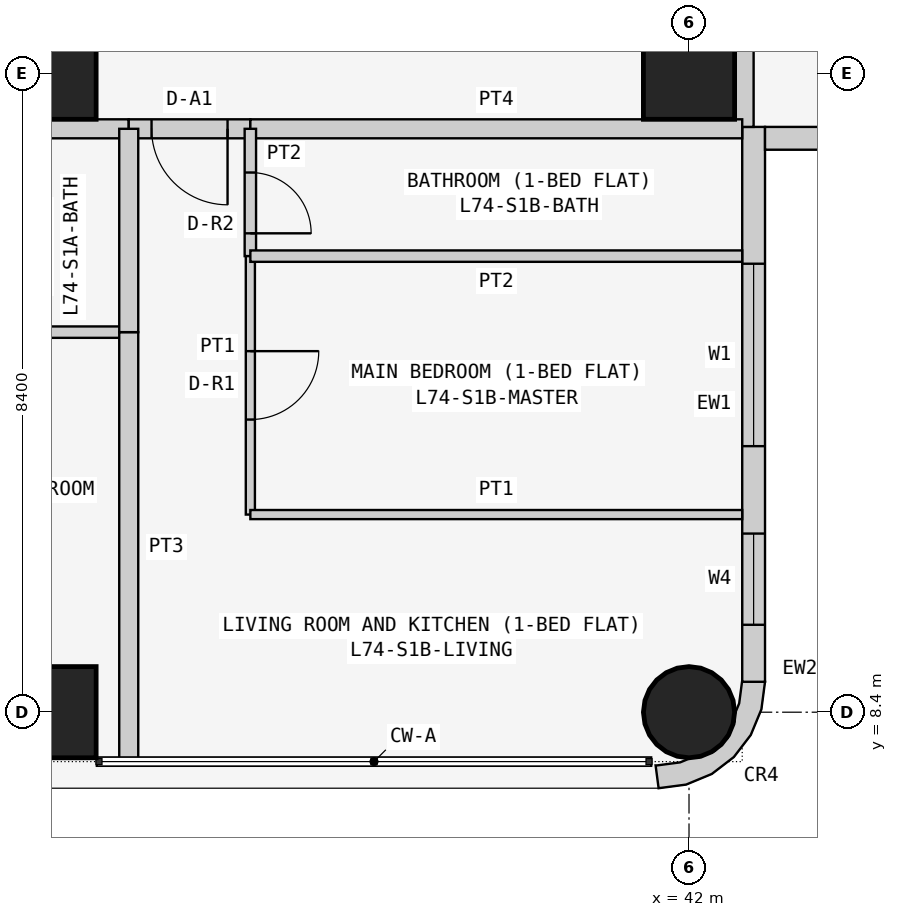
"""IFC4 building model, lengths in metres.
Left out: names, types, materials, properties, quantities, classifications, styles, units other than length and angle.
Written with IfcOpenShell. Run it as: python <this file> out.ifc"""

import sys

from ifc_helpers import new_model, si_unit, direction, frame, frame_2d, origin, origin_2d, place, context, subcontext, project, spatial, polyline, rectangle, circle, outline, extrude, element, fill, save


model = new_model("IFC4")
c1 = context("Model", 3, precision=1e-05, world=origin(), true_north=direction((0.0, 1.0)))
c2 = subcontext(c1, "Body", "Model", "MODEL_VIEW")
j1 = project(units=[si_unit("LENGTHUNIT", "METRE"), si_unit("PLANEANGLEUNIT", "RADIAN")], contexts=[c1])
p1 = place(None, origin())
s1 = spatial("IfcSite", under=j1, at=p1, CompositionType="ELEMENT")
p2 = place(p1, origin())
s2 = spatial("IfcBuilding", under=s1, at=p2, CompositionType="ELEMENT")
p3 = place(p2, frame((0.0, 0.0, 282.9)))
s3 = spatial("IfcBuildingStorey", under=s2, at=p3, CompositionType="ELEMENT", Elevation=282.9)
for number, where, z_axis, x_axis in (
    (1, (33.6, 8.4, 0.0), (0.0, 0.0, 1.0), (1.0, 0.0, 0.0)),
    (2, (33.6, 16.8, 0.0), (0.0, 0.0, 1.0), (1.0, 0.0, 0.0)),
):
    element("IfcColumn", number, at=place(p3, frame(where, z_axis=z_axis, x_axis=x_axis)), inside=s3, PredefinedType="COLUMN", context=c2, shape_type="SweptSolid", body=[
        extrude(rectangle(XDim=1.2, YDim=1.2, at=origin_2d()), origin(), (0.0, 0.0, 1.0), 3.6),
    ])
p4 = place(p3, frame((42.0, 8.4, 0.0), z_axis=(0.0, 0.0, 1.0), x_axis=(1.0, 0.0, 0.0)))
e3 = element("IfcColumn", 3, at=p4, inside=s3, PredefinedType="COLUMN", context=c2, shape_type="SweptSolid", body=[
    extrude(circle(Radius=0.6, at=origin_2d()), origin(), (0.0, 0.0, 1.0), 3.6),
])
p5 = place(p3, frame((42.0, 16.8, 0.0), z_axis=(0.0, 0.0, 1.0), x_axis=(1.0, 0.0, 0.0)))
e4 = element("IfcColumn", 4, at=p5, inside=s3, PredefinedType="COLUMN", context=c2, shape_type="SweptSolid", body=[
    extrude(rectangle(XDim=1.2, YDim=1.2, at=origin_2d()), origin(), (0.0, 0.0, 1.0), 3.6),
])
p6 = place(p3, frame((42.85, 8.8, 0.0), z_axis=(0.0, 0.0, 1.0), x_axis=(0.0, 1.0, 0.0)))
e5 = element("IfcWall", 5, at=p6, inside=s3, PredefinedType="SOLIDWALL", context=c2, shape_type="SweptSolid", body=[
    extrude(rectangle(XDim=7.3, YDim=0.3, at=frame_2d((3.65, 0.0))), origin(), (0.0, 0.0, 1.0), 3.45),
])
p7 = place(p6, frame((3.1, 0.0, 0.9)))
e6 = element("IfcOpeningElement", 6, at=p7, cuts=e5, PredefinedType="OPENING", context=c2, shape_type="SweptSolid", body=[
    extrude(rectangle(XDim=2.4, YDim=1.5, at=frame_2d((1.2, 0.75))), frame((0.0, 0.16, 0.0), z_axis=(0.0, -1.0, 0.0), x_axis=(1.0, 0.0, 0.0)), (0.0, 0.0, 1.0), 0.32),
])
p8 = place(p6, frame((0.75, 0.0, 0.9)))
e7 = element("IfcOpeningElement", 7, at=p8, cuts=e5, PredefinedType="OPENING", context=c2, shape_type="SweptSolid", body=[
    extrude(rectangle(XDim=1.2, YDim=1.5, at=frame_2d((0.6, 0.75))), frame((0.0, 0.16, 0.0), z_axis=(0.0, -1.0, 0.0), x_axis=(1.0, 0.0, 0.0)), (0.0, 0.0, 1.0), 0.32),
])
p9 = place(p3, frame((43.0, 15.95, 0.0), z_axis=(0.0, 0.0, 1.0), x_axis=(1.0, 0.0, 0.0)))
e8 = element("IfcWall", 8, at=p9, inside=s3, PredefinedType="SOLIDWALL", context=c2, shape_type="SweptSolid", body=[
    extrude(rectangle(XDim=7.0, YDim=0.3, at=frame_2d((3.5, 0.0))), origin(), (0.0, 0.0, 1.0), 3.45),
])
p10 = place(p9, frame((1.5, 0.0, 0.9)))
e9 = element("IfcOpeningElement", 9, at=p10, cuts=e8, PredefinedType="OPENING", context=c2, shape_type="SweptSolid", body=[
    extrude(rectangle(XDim=2.4, YDim=1.5, at=frame_2d((1.2, 0.75))), frame((0.0, 0.16, 0.0), z_axis=(0.0, -1.0, 0.0), x_axis=(1.0, 0.0, 0.0)), (0.0, 0.0, 1.0), 0.32),
])
p11 = place(p9, frame((5.05, 0.0, 0.9)))
e10 = element("IfcOpeningElement", 10, at=p11, cuts=e8, PredefinedType="OPENING", context=c2, shape_type="SweptSolid", body=[
    extrude(rectangle(XDim=1.2, YDim=1.5, at=frame_2d((0.6, 0.75))), frame((0.0, 0.16, 0.0), z_axis=(0.0, -1.0, 0.0), x_axis=(1.0, 0.0, 0.0)), (0.0, 0.0, 1.0), 0.32),
])
p12 = place(p3, frame((41.638, 7.824, 0.0), z_axis=(0.0, 0.0, 1.0), x_axis=(0.707106781187, -0.707106781187, 0.0)))
e11 = element("IfcWall", 11, at=p12, inside=s3, PredefinedType="SOLIDWALL", context=c2, shape_type="SweptSolid", body=[
    extrude(outline(polyline([(0.033, 1.469), (0.047, 1.455), (0.233, 1.212), (0.292, 1.069), (0.358, 1.003), (0.449, 0.782), (0.449, 0.543), (0.358, 0.322), (0.292, 0.257), (0.233, 0.114), (0.047, -0.129), (0.033, -0.143), (0.273, -0.327), (0.495, -0.037), (0.635, 0.301), (0.683, 0.663), (0.635, 1.025), (0.495, 1.363), (0.273, 1.653), (0.033, 1.469)])), origin(), (0.0, 0.0, 1.0), 3.45),
])
p13 = place(p3, frame((42.725, 22.971, 0.0), z_axis=(0.0, 0.0, 1.0), x_axis=(0.0, -1.0, 0.0)))
e12 = element("IfcWall", 12, at=p13, inside=s3, PredefinedType="PARTITIONING", context=c2, shape_type="SweptSolid", body=[
    extrude(rectangle(XDim=6.871, YDim=0.25, at=frame_2d((3.436, 0.0))), origin(), (0.0, 0.0, 1.0), 3.45),
])
p14 = place(p3, frame((34.629, 16.075, 0.0), z_axis=(0.0, 0.0, 1.0), x_axis=(-1.0, 0.0, 0.0)))
e13 = element("IfcWall", 13, at=p14, inside=s3, PredefinedType="PARTITIONING", context=c2, shape_type="SweptSolid", body=[
    extrude(rectangle(XDim=2.629, YDim=0.25, at=frame_2d((1.314, 0.0))), origin(), (0.0, 0.0, 1.0), 3.45),
])
p15 = place(p3, frame((36.229, 16.075, 0.0), z_axis=(0.0, 0.0, 1.0), x_axis=(-1.0, 0.0, 0.0)))
e14 = element("IfcWall", 14, at=p15, inside=s3, PredefinedType="PARTITIONING", context=c2, shape_type="SweptSolid", body=[
    extrude(rectangle(XDim=1.6, YDim=0.25, at=frame_2d((0.8, 0.0))), origin(), (0.0, 0.0, 1.0), 3.45),
])
p16 = place(p15, frame((0.3, 0.0, 0.0)))
e15 = element("IfcOpeningElement", 15, at=p16, cuts=e14, PredefinedType="OPENING", context=c2, shape_type="SweptSolid", body=[
    extrude(rectangle(XDim=1.0, YDim=2.1, at=frame_2d((0.5, 1.05))), frame((0.0, 0.135, 0.0), z_axis=(0.0, -1.0, 0.0), x_axis=(1.0, 0.0, 0.0)), (0.0, 0.0, 1.0), 0.27),
])
p17 = place(p3, frame((42.7, 16.075, 0.0), z_axis=(0.0, 0.0, 1.0), x_axis=(-1.0, 0.0, 0.0)))
e16 = element("IfcWall", 16, at=p17, inside=s3, PredefinedType="PARTITIONING", context=c2, shape_type="SweptSolid", body=[
    extrude(rectangle(XDim=6.471, YDim=0.25, at=frame_2d((3.235, 0.0))), origin(), (0.0, 0.0, 1.0), 3.45),
])
p18 = place(p3, frame((32.0, 13.4, 0.0), z_axis=(0.0, 0.0, 1.0), x_axis=(1.0, 0.0, 0.0)))
e17 = element("IfcWall", 17, at=p18, inside=s3, PredefinedType="PARTITIONING", context=c2, shape_type="SweptSolid", body=[
    extrude(rectangle(XDim=2.629, YDim=0.15, at=frame_2d((1.314, 0.0))), origin(), (0.0, 0.0, 1.0), 3.45),
])
p19 = place(p3, frame((34.629, 13.4, 0.0), z_axis=(0.0, 0.0, 1.0), x_axis=(0.0, -1.0, 0.0)))
e18 = element("IfcWall", 18, at=p19, inside=s3, PredefinedType="PARTITIONING", context=c2, shape_type="SweptSolid", body=[
    extrude(rectangle(XDim=5.65, YDim=0.25, at=frame_2d((2.825, 0.0))), origin(), (0.0, 0.0, 1.0), 3.45),
])
p20 = place(p3, frame((34.629, 13.4, 0.0), z_axis=(0.0, 0.0, 1.0), x_axis=(0.0, 1.0, 0.0)))
e19 = element("IfcWall", 19, at=p20, inside=s3, PredefinedType="PARTITIONING", context=c2, shape_type="SweptSolid", body=[
    extrude(rectangle(XDim=2.675, YDim=0.25, at=frame_2d((1.337, 0.0))), origin(), (0.0, 0.0, 1.0), 3.45),
])
p21 = place(p3, frame((36.229, 16.075, 0.0), z_axis=(0.0, 0.0, 1.0), x_axis=(0.0, -1.0, 0.0)))
e20 = element("IfcWall", 20, at=p21, inside=s3, PredefinedType="PARTITIONING", context=c2, shape_type="SweptSolid", body=[
    extrude(rectangle(XDim=1.675, YDim=0.15, at=frame_2d((0.837, 0.0))), origin(), (0.0, 0.0, 1.0), 3.45),
])
p22 = place(p21, frame((0.575, 0.0, 0.0)))
e21 = element("IfcOpeningElement", 21, at=p22, cuts=e20, PredefinedType="OPENING", context=c2, shape_type="SweptSolid", body=[
    extrude(rectangle(XDim=0.8, YDim=2.1, at=frame_2d((0.4, 1.05))), frame((0.0, 0.085, 0.0), z_axis=(0.0, -1.0, 0.0), x_axis=(1.0, 0.0, 0.0)), (0.0, 0.0, 1.0), 0.17),
])
p23 = place(p3, frame((36.229, 14.4, 0.0), z_axis=(0.0, 0.0, 1.0), x_axis=(0.0, -1.0, 0.0)))
e22 = element("IfcWall", 22, at=p23, inside=s3, PredefinedType="PARTITIONING", context=c2, shape_type="SweptSolid", body=[
    extrude(rectangle(XDim=3.4, YDim=0.12, at=frame_2d((1.7, 0.0))), origin(), (0.0, 0.0, 1.0), 3.45),
])
p24 = place(p23, frame((1.25, 0.0, 0.0)))
e23 = element("IfcOpeningElement", 23, at=p24, cuts=e22, PredefinedType="OPENING", context=c2, shape_type="SweptSolid", body=[
    extrude(rectangle(XDim=0.9, YDim=2.1, at=frame_2d((0.45, 1.05))), frame((0.0, 0.07, 0.0), z_axis=(0.0, -1.0, 0.0), x_axis=(1.0, 0.0, 0.0)), (0.0, 0.0, 1.0), 0.14),
])
p25 = place(p3, frame((36.229, 11.0, 0.0), z_axis=(0.0, 0.0, 1.0), x_axis=(1.0, 0.0, 0.0)))
e24 = element("IfcWall", 24, at=p25, inside=s3, PredefinedType="PARTITIONING", context=c2, shape_type="SweptSolid", body=[
    extrude(rectangle(XDim=6.471, YDim=0.12, at=frame_2d((3.235, 0.0))), origin(), (0.0, 0.0, 1.0), 3.45),
])
p26 = place(p3, frame((36.229, 14.4, 0.0), z_axis=(0.0, 0.0, 1.0), x_axis=(1.0, 0.0, 0.0)))
e25 = element("IfcWall", 25, at=p26, inside=s3, PredefinedType="PARTITIONING", context=c2, shape_type="SweptSolid", body=[
    extrude(rectangle(XDim=6.471, YDim=0.15, at=frame_2d((3.235, 0.0))), origin(), (0.0, 0.0, 1.0), 3.45),
])
p27 = place(p7, origin())
e26 = element("IfcWindow", 26, at=p27, inside=s3, PartitioningType="SINGLE_PANEL", PredefinedType="WINDOW", context=c2, shape_type="SweptSolid", body=[
    extrude(rectangle(XDim=2.4, YDim=1.5, at=frame_2d((1.2, 0.75))), frame((0.0, 0.03, 0.0), z_axis=(0.0, -1.0, 0.0), x_axis=(1.0, 0.0, 0.0)), (0.0, 0.0, 1.0), 0.06),
])
fill(e6, e26)
p28 = place(p8, origin())
e27 = element("IfcWindow", 27, at=p28, inside=s3, PartitioningType="SINGLE_PANEL", PredefinedType="WINDOW", context=c2, shape_type="SweptSolid", body=[
    extrude(rectangle(XDim=1.2, YDim=1.5, at=frame_2d((0.6, 0.75))), frame((0.0, 0.03, 0.0), z_axis=(0.0, -1.0, 0.0), x_axis=(1.0, 0.0, 0.0)), (0.0, 0.0, 1.0), 0.06),
])
fill(e7, e27)
p29 = place(p16, origin())
e28 = element("IfcDoor", 28, at=p29, inside=s3, OperationType="SINGLE_SWING_LEFT", PredefinedType="DOOR", context=c2, shape_type="SweptSolid", body=[
    extrude(rectangle(XDim=1.0, YDim=2.1, at=frame_2d((0.5, 1.05))), frame((0.0, 0.025, 0.0), z_axis=(0.0, -1.0, 0.0), x_axis=(1.0, 0.0, 0.0)), (0.0, 0.0, 1.0), 0.05),
])
fill(e15, e28)
p30 = place(p22, origin())
e29 = element("IfcDoor", 29, at=p30, inside=s3, OperationType="SINGLE_SWING_RIGHT", PredefinedType="DOOR", context=c2, shape_type="SweptSolid", body=[
    extrude(rectangle(XDim=0.8, YDim=2.1, at=frame_2d((0.4, 1.05))), frame((0.0, 0.025, 0.0), z_axis=(0.0, -1.0, 0.0), x_axis=(1.0, 0.0, 0.0)), (0.0, 0.0, 1.0), 0.05),
])
fill(e21, e29)
p31 = place(p24, origin())
e30 = element("IfcDoor", 30, at=p31, inside=s3, OperationType="SINGLE_SWING_LEFT", PredefinedType="DOOR", context=c2, shape_type="SweptSolid", body=[
    extrude(rectangle(XDim=0.9, YDim=2.1, at=frame_2d((0.45, 1.05))), frame((0.0, 0.025, 0.0), z_axis=(0.0, -1.0, 0.0), x_axis=(1.0, 0.0, 0.0)), (0.0, 0.0, 1.0), 0.05),
])
fill(e23, e30)
save(model, sys.argv[1])
